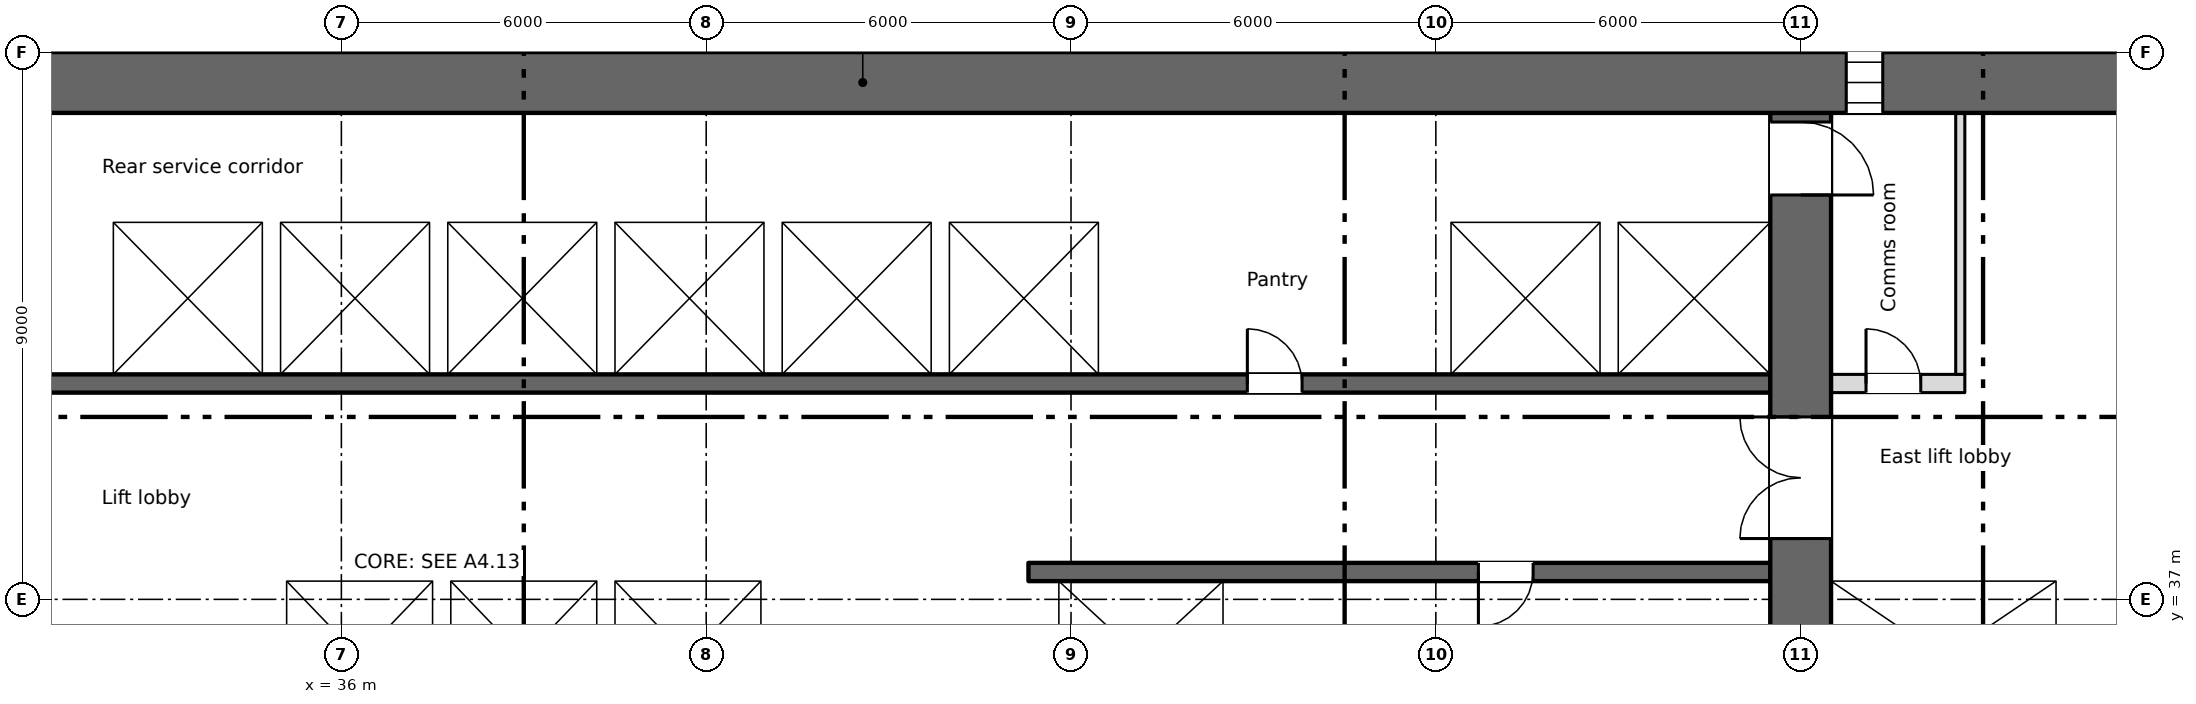
"""IFC4 building model, lengths in metres.
Left out: names, types, materials, properties, quantities, classifications, styles, units other than length and angle.
Written with IfcOpenShell. Run it as: python <this file> out.ifc"""

import sys

from ifc_helpers import new_model, si_unit, direction, frame, frame_2d, origin, place, context, subcontext, project, spatial, rectangle, extrude, element, fill, save


model = new_model("IFC4")
c1 = context("Model", 3, precision=1e-05, world=origin(), true_north=direction((0.0, 1.0)))
c2 = subcontext(c1, "Body", "Model", "MODEL_VIEW")
j1 = project(units=[si_unit("LENGTHUNIT", "METRE"), si_unit("PLANEANGLEUNIT", "RADIAN")], contexts=[c1])
p1 = place(None, origin())
s1 = spatial("IfcSite", under=j1, at=p1, CompositionType="ELEMENT")
p2 = place(p1, origin())
s2 = spatial("IfcBuilding", under=s1, at=p2, CompositionType="ELEMENT")
p3 = place(p2, frame((0.0, 0.0, 86.25)))
s3 = spatial("IfcBuildingStorey", under=s2, at=p3, CompositionType="ELEMENT", Elevation=86.25)
p4 = place(p3, frame((5.55, 45.5, 0.0), z_axis=(0.0, 0.0, 1.0), x_axis=(1.0, 0.0, 0.0)))
e1 = element("IfcWall", 1, at=p4, inside=s3, PredefinedType="SHEAR", context=c2, shape_type="SweptSolid", body=[
    extrude(rectangle(XDim=66.9, YDim=1.0, at=frame_2d((33.45, 0.0))), origin(), (0.0, 0.0, 1.0), 3.15),
])
p5 = place(p4, frame((1.2, 0.0, 0.6)))
e2 = element("IfcOpeningElement", 2, at=p5, cuts=e1, PredefinedType="OPENING", context=c2, shape_type="SweptSolid", body=[
    extrude(rectangle(XDim=0.6, YDim=2.4, at=frame_2d((0.3, 1.2))), frame((0.0, 0.51, 0.0), z_axis=(0.0, -1.0, 0.0), x_axis=(1.0, 0.0, 0.0)), (0.0, 0.0, 1.0), 1.02),
])
p6 = place(p4, frame((7.2, 0.0, 0.6)))
e3 = element("IfcOpeningElement", 3, at=p6, cuts=e1, PredefinedType="OPENING", context=c2, shape_type="SweptSolid", body=[
    extrude(rectangle(XDim=0.6, YDim=2.4, at=frame_2d((0.3, 1.2))), frame((0.0, 0.51, 0.0), z_axis=(0.0, -1.0, 0.0), x_axis=(1.0, 0.0, 0.0)), (0.0, 0.0, 1.0), 1.02),
])
p7 = place(p4, frame((55.2, 0.0, 0.6)))
e4 = element("IfcOpeningElement", 4, at=p7, cuts=e1, PredefinedType="OPENING", context=c2, shape_type="SweptSolid", body=[
    extrude(rectangle(XDim=0.6, YDim=2.4, at=frame_2d((0.3, 1.2))), frame((0.0, 0.51, 0.0), z_axis=(0.0, -1.0, 0.0), x_axis=(1.0, 0.0, 0.0)), (0.0, 0.0, 1.0), 1.02),
])
p8 = place(p4, frame((61.2, 0.0, 0.6)))
e5 = element("IfcOpeningElement", 5, at=p8, cuts=e1, PredefinedType="OPENING", context=c2, shape_type="SweptSolid", body=[
    extrude(rectangle(XDim=0.6, YDim=2.4, at=frame_2d((0.3, 1.2))), frame((0.0, 0.51, 0.0), z_axis=(0.0, -1.0, 0.0), x_axis=(1.0, 0.0, 0.0)), (0.0, 0.0, 1.0), 1.02),
])
p9 = place(p3, frame((64.35, 34.8, 0.0), z_axis=(0.0, 0.0, 1.0), x_axis=(0.0, 1.0, 0.0)))
e6 = element("IfcWall", 6, at=p9, inside=s3, PredefinedType="SHEAR", context=c2, shape_type="SweptSolid", body=[
    extrude(rectangle(XDim=10.2, YDim=0.3, at=frame_2d((5.1, 0.0))), origin(), (0.0, 0.0, 1.0), 3.15),
])
p10 = place(p3, frame((60.0, 28.4, 0.0), z_axis=(0.0, 0.0, 1.0), x_axis=(0.0, 1.0, 0.0)))
e7 = element("IfcWall", 7, at=p10, inside=s3, PredefinedType="SHEAR", context=c2, shape_type="SweptSolid", body=[
    extrude(rectangle(XDim=16.6, YDim=1.0, at=frame_2d((8.3, 0.0))), origin(), (0.0, 0.0, 1.0), 3.15),
])
p11 = place(p10, frame((9.6, 0.0, 0.0)))
e8 = element("IfcOpeningElement", 8, at=p11, cuts=e7, PredefinedType="OPENING", context=c2, shape_type="SweptSolid", body=[
    extrude(rectangle(XDim=2.0, YDim=2.1, at=frame_2d((1.0, 1.05))), frame((0.0, 0.51, 0.0), z_axis=(0.0, -1.0, 0.0), x_axis=(1.0, 0.0, 0.0)), (0.0, 0.0, 1.0), 1.02),
])
p12 = place(p10, frame((15.25, 0.0, 0.0)))
e9 = element("IfcOpeningElement", 9, at=p12, cuts=e7, PredefinedType="OPENING", context=c2, shape_type="SweptSolid", body=[
    extrude(rectangle(XDim=1.2, YDim=2.1, at=frame_2d((0.6, 1.05))), frame((0.0, 0.51, 0.0), z_axis=(0.0, -1.0, 0.0), x_axis=(1.0, 0.0, 0.0)), (0.0, 0.0, 1.0), 1.02),
])
p13 = place(p3, frame((34.8, 37.45, 0.0), z_axis=(0.0, 0.0, 1.0), x_axis=(1.0, 0.0, 0.0)))
e10 = element("IfcWall", 10, at=p13, inside=s3, PredefinedType="SHEAR", context=c2, shape_type="SweptSolid", body=[
    extrude(rectangle(XDim=8.4, YDim=0.3, at=frame_2d((4.2, 0.0))), origin(), (0.0, 0.0, 1.0), 3.15),
])
p14 = place(p13, frame((0.95, 0.0, 0.0)))
e11 = element("IfcOpeningElement", 11, at=p14, cuts=e10, PredefinedType="OPENING", context=c2, shape_type="SweptSolid", body=[
    extrude(rectangle(XDim=1.1, YDim=2.1, at=frame_2d((0.55, 1.05))), frame((0.0, 0.16, 0.0), z_axis=(0.0, -1.0, 0.0), x_axis=(1.0, 0.0, 0.0)), (0.0, 0.0, 1.0), 0.32),
])
p15 = place(p13, frame((3.65, 0.0, 0.0)))
e12 = element("IfcOpeningElement", 12, at=p15, cuts=e10, PredefinedType="OPENING", context=c2, shape_type="SweptSolid", body=[
    extrude(rectangle(XDim=1.1, YDim=2.1, at=frame_2d((0.55, 1.05))), frame((0.0, 0.16, 0.0), z_axis=(0.0, -1.0, 0.0), x_axis=(1.0, 0.0, 0.0)), (0.0, 0.0, 1.0), 0.32),
])
p16 = place(p13, frame((6.35, 0.0, 0.0)))
e13 = element("IfcOpeningElement", 13, at=p16, cuts=e10, PredefinedType="OPENING", context=c2, shape_type="SweptSolid", body=[
    extrude(rectangle(XDim=1.1, YDim=2.1, at=frame_2d((0.55, 1.05))), frame((0.0, 0.16, 0.0), z_axis=(0.0, -1.0, 0.0), x_axis=(1.0, 0.0, 0.0)), (0.0, 0.0, 1.0), 0.32),
])
p17 = place(p3, frame((59.5, 37.45, 0.0), z_axis=(0.0, 0.0, 1.0), x_axis=(-1.0, 0.0, 0.0)))
e14 = element("IfcWall", 14, at=p17, inside=s3, PredefinedType="SHEAR", context=c2, shape_type="SweptSolid", body=[
    extrude(rectangle(XDim=12.2, YDim=0.3, at=frame_2d((6.1, 0.0))), origin(), (0.0, 0.0, 1.0), 3.15),
])
p18 = place(p17, frame((3.9, 0.0, 0.0)))
e15 = element("IfcOpeningElement", 15, at=p18, cuts=e14, PredefinedType="OPENING", context=c2, shape_type="SweptSolid", body=[
    extrude(rectangle(XDim=0.9, YDim=2.1, at=frame_2d((0.45, 1.05))), frame((0.0, 0.16, 0.0), z_axis=(0.0, -1.0, 0.0), x_axis=(1.0, 0.0, 0.0)), (0.0, 0.0, 1.0), 0.32),
])
p19 = place(p3, frame((60.5, 37.45, 0.0), z_axis=(0.0, 0.0, 1.0), x_axis=(1.0, 0.0, 0.0)))
e16 = element("IfcWall", 16, at=p19, inside=s3, PredefinedType="SHEAR", context=c2, shape_type="SweptSolid", body=[
    extrude(rectangle(XDim=3.7, YDim=0.3, at=frame_2d((1.85, 0.0))), origin(), (0.0, 0.0, 1.0), 3.15),
])
p20 = place(p19, frame((1.3, 0.0, 0.0)))
e17 = element("IfcOpeningElement", 17, at=p20, cuts=e16, PredefinedType="OPENING", context=c2, shape_type="SweptSolid", body=[
    extrude(rectangle(XDim=1.1, YDim=2.1, at=frame_2d((0.55, 1.05))), frame((0.0, 0.16, 0.0), z_axis=(0.0, -1.0, 0.0), x_axis=(1.0, 0.0, 0.0)), (0.0, 0.0, 1.0), 0.32),
])
for number, where, z_axis, x_axis in (
    (18, (34.95, 34.8, 0.0), (0.0, 0.0, 1.0), (0.0, 1.0, 0.0)),
    (19, (43.05, 34.8, 0.0), (0.0, 0.0, 1.0), (0.0, 1.0, 0.0)),
):
    element("IfcWall", number, at=place(p3, frame(where, z_axis=z_axis, x_axis=x_axis)), inside=s3, PredefinedType="SHEAR", context=c2, shape_type="SweptSolid", body=[
        extrude(rectangle(XDim=2.5, YDim=0.3, at=frame_2d((1.25, 0.0))), origin(), (0.0, 0.0, 1.0), 3.15),
    ])
p21 = place(p3, frame((47.55, 34.8, 0.0), z_axis=(0.0, 0.0, 1.0), x_axis=(0.0, 1.0, 0.0)))
e20 = element("IfcWall", 20, at=p21, inside=s3, PredefinedType="SHEAR", context=c2, shape_type="SweptSolid", body=[
    extrude(rectangle(XDim=2.5, YDim=0.5, at=frame_2d((1.25, 0.0))), origin(), (0.0, 0.0, 1.0), 3.15),
])
p22 = place(p3, frame((50.65, 34.8, 0.0), z_axis=(0.0, 0.0, 1.0), x_axis=(0.0, 1.0, 0.0)))
e21 = element("IfcWall", 21, at=p22, inside=s3, PredefinedType="SHEAR", context=c2, shape_type="SweptSolid", body=[
    extrude(rectangle(XDim=2.5, YDim=0.3, at=frame_2d((1.25, 0.0))), origin(), (0.0, 0.0, 1.0), 3.15),
])
p23 = place(p3, frame((18.5, 40.55, 0.0), z_axis=(0.0, 0.0, 1.0), x_axis=(1.0, 0.0, 0.0)))
e22 = element("IfcWall", 22, at=p23, inside=s3, PredefinedType="SHEAR", context=c2, shape_type="SweptSolid", body=[
    extrude(rectangle(XDim=41.0, YDim=0.3, at=frame_2d((20.5, 0.0))), origin(), (0.0, 0.0, 1.0), 3.15),
])
p24 = place(p23, frame((9.025, 0.0, 0.0)))
e23 = element("IfcOpeningElement", 23, at=p24, cuts=e22, PredefinedType="OPENING", context=c2, shape_type="SweptSolid", body=[
    extrude(rectangle(XDim=0.9, YDim=2.1, at=frame_2d((0.45, 1.05))), frame((0.0, 0.16, 0.0), z_axis=(0.0, -1.0, 0.0), x_axis=(1.0, 0.0, 0.0)), (0.0, 0.0, 1.0), 0.32),
])
p25 = place(p23, frame((32.4, 0.0, 0.0)))
e24 = element("IfcOpeningElement", 24, at=p25, cuts=e22, PredefinedType="OPENING", context=c2, shape_type="SweptSolid", body=[
    extrude(rectangle(XDim=0.9, YDim=2.1, at=frame_2d((0.45, 1.05))), frame((0.0, 0.16, 0.0), z_axis=(0.0, -1.0, 0.0), x_axis=(1.0, 0.0, 0.0)), (0.0, 0.0, 1.0), 0.32),
])
p26 = place(p23, frame((14.425, 0.0, 0.0)))
e25 = element("IfcOpeningElement", 25, at=p26, cuts=e22, PredefinedType="OPENING", context=c2, shape_type="SweptSolid", body=[
    extrude(rectangle(XDim=1.1, YDim=2.1, at=frame_2d((0.55, 1.05))), frame((0.0, 0.16, 0.0), z_axis=(0.0, -1.0, 0.0), x_axis=(1.0, 0.0, 0.0)), (0.0, 0.0, 1.0), 0.32),
])
p27 = place(p23, frame((17.175, 0.0, 0.0)))
e26 = element("IfcOpeningElement", 26, at=p27, cuts=e22, PredefinedType="OPENING", context=c2, shape_type="SweptSolid", body=[
    extrude(rectangle(XDim=1.1, YDim=2.1, at=frame_2d((0.55, 1.05))), frame((0.0, 0.16, 0.0), z_axis=(0.0, -1.0, 0.0), x_axis=(1.0, 0.0, 0.0)), (0.0, 0.0, 1.0), 0.32),
])
p28 = place(p23, frame((19.925, 0.0, 0.0)))
e27 = element("IfcOpeningElement", 27, at=p28, cuts=e22, PredefinedType="OPENING", context=c2, shape_type="SweptSolid", body=[
    extrude(rectangle(XDim=1.1, YDim=2.1, at=frame_2d((0.55, 1.05))), frame((0.0, 0.16, 0.0), z_axis=(0.0, -1.0, 0.0), x_axis=(1.0, 0.0, 0.0)), (0.0, 0.0, 1.0), 0.32),
])
p29 = place(p23, frame((22.675, 0.0, 0.0)))
e28 = element("IfcOpeningElement", 28, at=p29, cuts=e22, PredefinedType="OPENING", context=c2, shape_type="SweptSolid", body=[
    extrude(rectangle(XDim=1.1, YDim=2.1, at=frame_2d((0.55, 1.05))), frame((0.0, 0.16, 0.0), z_axis=(0.0, -1.0, 0.0), x_axis=(1.0, 0.0, 0.0)), (0.0, 0.0, 1.0), 0.32),
])
p30 = place(p23, frame((36.375, 0.0, 0.0)))
e29 = element("IfcOpeningElement", 29, at=p30, cuts=e22, PredefinedType="OPENING", context=c2, shape_type="SweptSolid", body=[
    extrude(rectangle(XDim=1.2, YDim=2.1, at=frame_2d((0.6, 1.05))), frame((0.0, 0.16, 0.0), z_axis=(0.0, -1.0, 0.0), x_axis=(1.0, 0.0, 0.0)), (0.0, 0.0, 1.0), 0.32),
])
p31 = place(p23, frame((39.15, 0.0, 0.0)))
e30 = element("IfcOpeningElement", 30, at=p31, cuts=e22, PredefinedType="OPENING", context=c2, shape_type="SweptSolid", body=[
    extrude(rectangle(XDim=1.2, YDim=2.1, at=frame_2d((0.6, 1.05))), frame((0.0, 0.16, 0.0), z_axis=(0.0, -1.0, 0.0), x_axis=(1.0, 0.0, 0.0)), (0.0, 0.0, 1.0), 0.32),
])
p32 = place(p3, frame((18.5, 43.35, 0.0), z_axis=(0.0, 0.0, 1.0), x_axis=(1.0, 0.0, 0.0)))
e31 = element("IfcWall", 31, at=p32, inside=s3, PredefinedType="SHEAR", context=c2, shape_type="SweptSolid", body=[
    extrude(rectangle(XDim=41.0, YDim=0.3, at=frame_2d((20.5, 0.0))), origin(), (0.0, 0.0, 1.0), 3.15),
])
p33 = place(p3, frame((60.5, 40.55, 0.0), z_axis=(0.0, 0.0, 1.0), x_axis=(1.0, 0.0, 0.0)))
e32 = element("IfcWall", 32, at=p33, inside=s3, PredefinedType="PARTITIONING", context=c2, shape_type="SweptSolid", body=[
    extrude(rectangle(XDim=2.2, YDim=0.3, at=frame_2d((1.1, 0.0))), origin(), (0.0, 0.0, 1.0), 3.15),
])
p34 = place(p33, frame((0.575, 0.0, 0.0)))
e33 = element("IfcOpeningElement", 33, at=p34, cuts=e32, PredefinedType="OPENING", context=c2, shape_type="SweptSolid", body=[
    extrude(rectangle(XDim=0.9, YDim=2.1, at=frame_2d((0.45, 1.05))), frame((0.0, 0.16, 0.0), z_axis=(0.0, -1.0, 0.0), x_axis=(1.0, 0.0, 0.0)), (0.0, 0.0, 1.0), 0.32),
])
for number, where, z_axis, x_axis in (
    (34, (37.65, 34.8, 0.0), (0.0, 0.0, 1.0), (0.0, 1.0, 0.0)),
    (35, (40.35, 34.8, 0.0), (0.0, 0.0, 1.0), (0.0, 1.0, 0.0)),
    (36, (32.1, 40.7, 0.0), (0.0, 0.0, 1.0), (0.0, 1.0, 0.0)),
    (37, (34.85, 40.7, 0.0), (0.0, 0.0, 1.0), (0.0, 1.0, 0.0)),
    (38, (37.6, 40.7, 0.0), (0.0, 0.0, 1.0), (0.0, 1.0, 0.0)),
    (39, (40.35, 40.7, 0.0), (0.0, 0.0, 1.0), (0.0, 1.0, 0.0)),
    (40, (43.1, 40.7, 0.0), (0.0, 0.0, 1.0), (0.0, 1.0, 0.0)),
    (41, (45.85, 40.7, 0.0), (0.0, 0.0, 1.0), (0.0, 1.0, 0.0)),
    (42, (48.6, 40.7, 0.0), (0.0, 0.0, 1.0), (0.0, 1.0, 0.0)),
    (43, (54.1, 40.7, 0.0), (0.0, 0.0, 1.0), (0.0, 1.0, 0.0)),
    (44, (56.85, 40.7, 0.0), (0.0, 0.0, 1.0), (0.0, 1.0, 0.0)),
):
    element("IfcWall", number, at=place(p3, frame(where, z_axis=z_axis, x_axis=x_axis)), inside=s3, PredefinedType="SHEAR", context=c2, shape_type="SweptSolid", body=[
        extrude(rectangle(XDim=2.5, YDim=0.3, at=frame_2d((1.25, 0.0))), origin(), (0.0, 0.0, 1.0), 3.15),
    ])
p35 = place(p3, frame((62.625, 40.7, 0.0), z_axis=(0.0, 0.0, 1.0), x_axis=(0.0, 1.0, 0.0)))
e45 = element("IfcWall", 45, at=p35, inside=s3, PredefinedType="PARTITIONING", context=c2, shape_type="SweptSolid", body=[
    extrude(rectangle(XDim=4.3, YDim=0.15, at=frame_2d((2.15, 0.0))), origin(), (0.0, 0.0, 1.0), 3.15),
])
p36 = place(p7, origin())
e46 = element("IfcWindow", 46, at=p36, inside=s3, PartitioningType="SINGLE_PANEL", PredefinedType="WINDOW", context=c2, shape_type="SweptSolid", body=[
    extrude(rectangle(XDim=0.6, YDim=2.4, at=frame_2d((0.3, 1.2))), frame((0.0, 0.03, 0.0), z_axis=(0.0, -1.0, 0.0), x_axis=(1.0, 0.0, 0.0)), (0.0, 0.0, 1.0), 0.06),
])
fill(e4, e46)
p37 = place(p34, origin())
e47 = element("IfcDoor", 47, at=p37, inside=s3, OperationType="SINGLE_SWING_LEFT", PredefinedType="DOOR", context=c2, shape_type="SweptSolid", body=[
    extrude(rectangle(XDim=0.9, YDim=2.1, at=frame_2d((0.45, 1.05))), frame((0.0, 0.025, 0.0), z_axis=(0.0, -1.0, 0.0), x_axis=(1.0, 0.0, 0.0)), (0.0, 0.0, 1.0), 0.05),
])
fill(e33, e47)
p38 = place(p18, origin())
e48 = element("IfcDoor", 48, at=p38, inside=s3, OperationType="SINGLE_SWING_RIGHT", PredefinedType="DOOR", context=c2, shape_type="SweptSolid", body=[
    extrude(rectangle(XDim=0.9, YDim=2.1, at=frame_2d((0.45, 1.05))), frame((0.0, 0.025, 0.0), z_axis=(0.0, -1.0, 0.0), x_axis=(1.0, 0.0, 0.0)), (0.0, 0.0, 1.0), 0.05),
])
fill(e15, e48)
p39 = place(p25, origin())
e49 = element("IfcDoor", 49, at=p39, inside=s3, OperationType="SINGLE_SWING_LEFT", PredefinedType="DOOR", context=c2, shape_type="SweptSolid", body=[
    extrude(rectangle(XDim=0.9, YDim=2.1, at=frame_2d((0.45, 1.05))), frame((0.0, 0.025, 0.0), z_axis=(0.0, -1.0, 0.0), x_axis=(1.0, 0.0, 0.0)), (0.0, 0.0, 1.0), 0.05),
])
fill(e24, e49)
p40 = place(p14, origin())
e50 = element("IfcDoor", 50, at=p40, inside=s3, OperationType="SLIDING_TO_LEFT", PredefinedType="DOOR", context=c2, shape_type="SweptSolid", body=[
    extrude(rectangle(XDim=1.1, YDim=2.1, at=frame_2d((0.55, 1.05))), frame((0.0, 0.025, 0.0), z_axis=(0.0, -1.0, 0.0), x_axis=(1.0, 0.0, 0.0)), (0.0, 0.0, 1.0), 0.05),
])
fill(e11, e50)
p41 = place(p15, origin())
e51 = element("IfcDoor", 51, at=p41, inside=s3, OperationType="SLIDING_TO_LEFT", PredefinedType="DOOR", context=c2, shape_type="SweptSolid", body=[
    extrude(rectangle(XDim=1.1, YDim=2.1, at=frame_2d((0.55, 1.05))), frame((0.0, 0.025, 0.0), z_axis=(0.0, -1.0, 0.0), x_axis=(1.0, 0.0, 0.0)), (0.0, 0.0, 1.0), 0.05),
])
fill(e12, e51)
p42 = place(p16, origin())
e52 = element("IfcDoor", 52, at=p42, inside=s3, OperationType="SLIDING_TO_LEFT", PredefinedType="DOOR", context=c2, shape_type="SweptSolid", body=[
    extrude(rectangle(XDim=1.1, YDim=2.1, at=frame_2d((0.55, 1.05))), frame((0.0, 0.025, 0.0), z_axis=(0.0, -1.0, 0.0), x_axis=(1.0, 0.0, 0.0)), (0.0, 0.0, 1.0), 0.05),
])
fill(e13, e52)
p43 = place(p26, origin())
e53 = element("IfcDoor", 53, at=p43, inside=s3, OperationType="SLIDING_TO_LEFT", PredefinedType="DOOR", context=c2, shape_type="SweptSolid", body=[
    extrude(rectangle(XDim=1.1, YDim=2.1, at=frame_2d((0.55, 1.05))), frame((0.0, 0.025, 0.0), z_axis=(0.0, -1.0, 0.0), x_axis=(1.0, 0.0, 0.0)), (0.0, 0.0, 1.0), 0.05),
])
fill(e25, e53)
p44 = place(p27, origin())
e54 = element("IfcDoor", 54, at=p44, inside=s3, OperationType="SLIDING_TO_LEFT", PredefinedType="DOOR", context=c2, shape_type="SweptSolid", body=[
    extrude(rectangle(XDim=1.1, YDim=2.1, at=frame_2d((0.55, 1.05))), frame((0.0, 0.025, 0.0), z_axis=(0.0, -1.0, 0.0), x_axis=(1.0, 0.0, 0.0)), (0.0, 0.0, 1.0), 0.05),
])
fill(e26, e54)
p45 = place(p28, origin())
e55 = element("IfcDoor", 55, at=p45, inside=s3, OperationType="SLIDING_TO_LEFT", PredefinedType="DOOR", context=c2, shape_type="SweptSolid", body=[
    extrude(rectangle(XDim=1.1, YDim=2.1, at=frame_2d((0.55, 1.05))), frame((0.0, 0.025, 0.0), z_axis=(0.0, -1.0, 0.0), x_axis=(1.0, 0.0, 0.0)), (0.0, 0.0, 1.0), 0.05),
])
fill(e27, e55)
p46 = place(p29, origin())
e56 = element("IfcDoor", 56, at=p46, inside=s3, OperationType="SLIDING_TO_LEFT", PredefinedType="DOOR", context=c2, shape_type="SweptSolid", body=[
    extrude(rectangle(XDim=1.1, YDim=2.1, at=frame_2d((0.55, 1.05))), frame((0.0, 0.025, 0.0), z_axis=(0.0, -1.0, 0.0), x_axis=(1.0, 0.0, 0.0)), (0.0, 0.0, 1.0), 0.05),
])
fill(e28, e56)
p47 = place(p30, origin())
e57 = element("IfcDoor", 57, at=p47, inside=s3, OperationType="SLIDING_TO_LEFT", PredefinedType="DOOR", context=c2, shape_type="SweptSolid", body=[
    extrude(rectangle(XDim=1.2, YDim=2.1, at=frame_2d((0.6, 1.05))), frame((0.0, 0.025, 0.0), z_axis=(0.0, -1.0, 0.0), x_axis=(1.0, 0.0, 0.0)), (0.0, 0.0, 1.0), 0.05),
])
fill(e29, e57)
p48 = place(p31, origin())
e58 = element("IfcDoor", 58, at=p48, inside=s3, OperationType="SLIDING_TO_LEFT", PredefinedType="DOOR", context=c2, shape_type="SweptSolid", body=[
    extrude(rectangle(XDim=1.2, YDim=2.1, at=frame_2d((0.6, 1.05))), frame((0.0, 0.025, 0.0), z_axis=(0.0, -1.0, 0.0), x_axis=(1.0, 0.0, 0.0)), (0.0, 0.0, 1.0), 0.05),
])
fill(e30, e58)
p49 = place(p20, origin())
e59 = element("IfcDoor", 59, at=p49, inside=s3, OperationType="SLIDING_TO_LEFT", PredefinedType="DOOR", context=c2, shape_type="SweptSolid", body=[
    extrude(rectangle(XDim=1.1, YDim=2.1, at=frame_2d((0.55, 1.05))), frame((0.0, 0.025, 0.0), z_axis=(0.0, -1.0, 0.0), x_axis=(1.0, 0.0, 0.0)), (0.0, 0.0, 1.0), 0.05),
])
fill(e17, e59)
p50 = place(p11, origin())
e60 = element("IfcDoor", 60, at=p50, inside=s3, OperationType="DOUBLE_DOOR_SINGLE_SWING", PredefinedType="DOOR", context=c2, shape_type="SweptSolid", body=[
    extrude(rectangle(XDim=2.0, YDim=2.1, at=frame_2d((1.0, 1.05))), frame((0.0, 0.025, 0.0), z_axis=(0.0, -1.0, 0.0), x_axis=(1.0, 0.0, 0.0)), (0.0, 0.0, 1.0), 0.05),
])
fill(e8, e60)
p51 = place(p12, origin())
e61 = element("IfcDoor", 61, at=p51, inside=s3, OperationType="SINGLE_SWING_LEFT", PredefinedType="DOOR", context=c2, shape_type="SweptSolid", body=[
    extrude(rectangle(XDim=1.2, YDim=2.1, at=frame_2d((0.6, 1.05))), frame((0.0, 0.025, 0.0), z_axis=(0.0, -1.0, 0.0), x_axis=(1.0, 0.0, 0.0)), (0.0, 0.0, 1.0), 0.05),
])
fill(e9, e61)
save(model, sys.argv[1])
